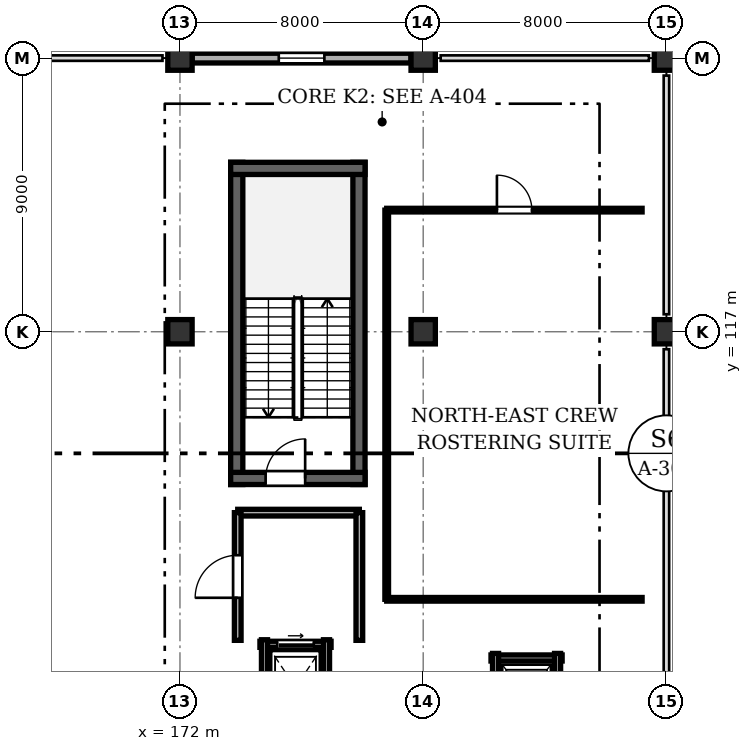
"""IFC4 building model, lengths in metres.
Left out: names, types, materials, properties, quantities, classifications, styles, units other than length and angle.
Written with IfcOpenShell. Run it as: python <this file> out.ifc"""

import sys

from ifc_helpers import new_model, si_unit, direction, frame, frame_2d, origin, origin_2d, place, context, subcontext, project, spatial, rectangle, extrude, element, fill, save


model = new_model("IFC4")
c1 = context("Model", 3, precision=1e-05, world=origin(), true_north=direction((0.0, 1.0)))
c2 = subcontext(c1, "Body", "Model", "MODEL_VIEW")
j1 = project(units=[si_unit("LENGTHUNIT", "METRE"), si_unit("PLANEANGLEUNIT", "RADIAN")], contexts=[c1])
p1 = place(None, origin())
s1 = spatial("IfcSite", under=j1, at=p1, CompositionType="ELEMENT")
p2 = place(p1, origin())
s2 = spatial("IfcBuilding", under=s1, at=p2, CompositionType="ELEMENT")
p3 = place(p2, frame((0.0, 0.0, 6.6)))
s3 = spatial("IfcBuildingStorey", under=s2, at=p3, CompositionType="ELEMENT", Elevation=6.6)
for number, where, z_axis, x_axis in (
    (1, (172.0, 117.0, 0.0), (0.0, 0.0, 1.0), (1.0, 0.0, 0.0)),
    (2, (172.0, 126.0, 0.0), (0.0, 0.0, 1.0), (1.0, 0.0, 0.0)),
    (3, (180.0, 117.0, 0.0), (0.0, 0.0, 1.0), (1.0, 0.0, 0.0)),
    (4, (180.0, 126.0, 0.0), (0.0, 0.0, 1.0), (1.0, 0.0, 0.0)),
    (5, (188.0, 117.0, 0.0), (0.0, 0.0, 1.0), (1.0, 0.0, 0.0)),
    (6, (188.0, 126.0, 0.0), (0.0, 0.0, 1.0), (1.0, 0.0, 0.0)),
):
    element("IfcColumn", number, at=place(p3, frame(where, z_axis=z_axis, x_axis=x_axis)), inside=s3, PredefinedType="COLUMN", context=c2, shape_type="SweptSolid", body=[
        extrude(rectangle(XDim=0.8, YDim=0.8, at=origin_2d()), origin(), (0.0, 0.0, 1.0), 4.2),
    ])
p4 = place(p3, frame((172.4, 126.0, 0.0), z_axis=(0.0, 0.0, 1.0), x_axis=(1.0, 0.0, 0.0)))
e7 = element("IfcWall", 7, at=p4, inside=s3, PredefinedType="SOLIDWALL", context=c2, shape_type="SweptSolid", body=[
    extrude(rectangle(XDim=7.2, YDim=0.32, at=frame_2d((3.6, 0.0))), origin(), (0.0, 0.0, 1.0), 3.495),
])
p5 = place(p4, frame((2.85, 0.0, 0.9)))
e8 = element("IfcOpeningElement", 8, at=p5, cuts=e7, PredefinedType="OPENING", context=c2, shape_type="SweptSolid", body=[
    extrude(rectangle(XDim=1.5, YDim=1.8, at=frame_2d((0.75, 0.9))), frame((0.0, 0.17, 0.0), z_axis=(0.0, -1.0, 0.0), x_axis=(1.0, 0.0, 0.0)), (0.0, 0.0, 1.0), 0.34),
])
for number, where, z_axis, x_axis in (
    (9, (177.887, 111.975, 0.0), (0.0, 0.0, 1.0), (0.0, 1.0, 0.0)),
    (10, (173.867, 122.573, 0.0), (0.0, 0.0, 1.0), (0.0, -1.0, 0.0)),
):
    element("IfcWall", number, at=place(p3, frame(where, z_axis=z_axis, x_axis=x_axis)), inside=s3, PredefinedType="SHEAR", context=c2, shape_type="SweptSolid", body=[
        extrude(rectangle(XDim=10.597, YDim=0.4, at=frame_2d((5.299, 0.0))), origin(), (0.0, 0.0, 1.0), 3.98),
    ])
p6 = place(p3, frame((178.087, 122.373, 0.0), z_axis=(0.0, 0.0, 1.0), x_axis=(-1.0, 0.0, 0.0)))
e11 = element("IfcWall", 11, at=p6, inside=s3, PredefinedType="SHEAR", context=c2, shape_type="SweptSolid", body=[
    extrude(rectangle(XDim=4.42, YDim=0.4, at=frame_2d((2.21, 0.0))), origin(), (0.0, 0.0, 1.0), 3.98),
])
p7 = place(p3, frame((173.667, 112.175, 0.0), z_axis=(0.0, 0.0, 1.0), x_axis=(1.0, 0.0, 0.0)))
e12 = element("IfcWall", 12, at=p7, inside=s3, PredefinedType="SHEAR", context=c2, shape_type="SweptSolid", body=[
    extrude(rectangle(XDim=4.42, YDim=0.4, at=frame_2d((2.21, 0.0))), origin(), (0.0, 0.0, 1.0), 3.98),
])
p8 = place(p7, frame((1.15, 0.0, 0.0)))
e13 = element("IfcOpeningElement", 13, at=p8, cuts=e12, PredefinedType="OPENING", context=c2, shape_type="SweptSolid", body=[
    extrude(rectangle(XDim=1.3, YDim=2.1, at=frame_2d((0.65, 1.05))), frame((0.0, 0.21, 0.0), z_axis=(0.0, -1.0, 0.0), x_axis=(1.0, 0.0, 0.0)), (0.0, 0.0, 1.0), 0.42),
])
p9 = place(p3, frame((176.97, 106.72, 0.0), z_axis=(0.0, 0.0, 1.0), x_axis=(-1.0, 0.0, 0.0)))
e14 = element("IfcWall", 14, at=p9, inside=s3, PredefinedType="SOLIDWALL", context=c2, shape_type="SweptSolid", body=[
    extrude(rectangle(XDim=2.34, YDim=0.2, at=frame_2d((1.17, 0.0))), origin(), (0.0, 0.0, 1.0), 3.955),
])
p10 = place(p9, frame((0.57, 0.0, 0.0)))
e15 = element("IfcOpeningElement", 15, at=p10, cuts=e14, PredefinedType="OPENING", context=c2, shape_type="SweptSolid", body=[
    extrude(rectangle(XDim=1.2, YDim=2.15, at=frame_2d((0.6, 1.075))), frame((0.0, 0.11, 0.0), z_axis=(0.0, -1.0, 0.0), x_axis=(1.0, 0.0, 0.0)), (0.0, 0.0, 1.0), 0.22),
])
for number, where, z_axis, x_axis in (
    (16, (174.78, 106.87, 0.0), (0.0, 0.0, 1.0), (0.0, -1.0, 0.0)),
    (17, (176.82, 103.73, 0.0), (0.0, 0.0, 1.0), (0.0, 1.0, 0.0)),
):
    element("IfcWall", number, at=place(p3, frame(where, z_axis=z_axis, x_axis=x_axis)), inside=s3, PredefinedType="SOLIDWALL", context=c2, shape_type="SweptSolid", body=[
        extrude(rectangle(XDim=3.14, YDim=0.2, at=frame_2d((1.57, 0.0))), origin(), (0.0, 0.0, 1.0), 3.515),
    ])
p11 = place(p3, frame((184.57, 106.27, 0.0), z_axis=(0.0, 0.0, 1.0), x_axis=(-1.0, 0.0, 0.0)))
e18 = element("IfcWall", 18, at=p11, inside=s3, PredefinedType="SOLIDWALL", context=c2, shape_type="SweptSolid", body=[
    extrude(rectangle(XDim=2.34, YDim=0.2, at=frame_2d((1.17, 0.0))), origin(), (0.0, 0.0, 1.0), 3.955),
])
for number, where, z_axis, x_axis in (
    (19, (182.38, 106.42, 0.0), (0.0, 0.0, 1.0), (0.0, -1.0, 0.0)),
    (20, (184.42, 103.58, 0.0), (0.0, 0.0, 1.0), (0.0, 1.0, 0.0)),
):
    element("IfcWall", number, at=place(p3, frame(where, z_axis=z_axis, x_axis=x_axis)), inside=s3, PredefinedType="SOLIDWALL", context=c2, shape_type="SweptSolid", body=[
        extrude(rectangle(XDim=2.84, YDim=0.2, at=frame_2d((1.42, 0.0))), origin(), (0.0, 0.0, 1.0), 3.515),
    ])
p12 = place(p3, frame((187.2, 108.2, 0.0), z_axis=(0.0, 0.0, 1.0), x_axis=(-1.0, 0.0, 0.0)))
e21 = element("IfcWall", 21, at=p12, inside=s3, PredefinedType="PARTITIONING", context=c2, shape_type="SweptSolid", body=[
    extrude(rectangle(XDim=8.4, YDim=0.12, at=frame_2d((4.2, 0.0))), origin(), (0.0, 0.0, 1.0), 3.355),
])
p13 = place(p3, frame((178.8, 121.0, 0.0), z_axis=(0.0, 0.0, 1.0), x_axis=(1.0, 0.0, 0.0)))
e22 = element("IfcWall", 22, at=p13, inside=s3, PredefinedType="PARTITIONING", context=c2, shape_type="SweptSolid", body=[
    extrude(rectangle(XDim=8.4, YDim=0.12, at=frame_2d((4.2, 0.0))), origin(), (0.0, 0.0, 1.0), 3.495),
])
p14 = place(p13, frame((3.625, 0.0, 0.0)))
e23 = element("IfcOpeningElement", 23, at=p14, cuts=e22, PredefinedType="OPENING", context=c2, shape_type="SweptSolid", body=[
    extrude(rectangle(XDim=1.15, YDim=2.1, at=frame_2d((0.575, 1.05))), frame((0.0, 0.07, 0.0), z_axis=(0.0, -1.0, 0.0), x_axis=(1.0, 0.0, 0.0)), (0.0, 0.0, 1.0), 0.14),
])
p15 = place(p3, frame((178.8, 108.2, 0.0), z_axis=(0.0, 0.0, 1.0), x_axis=(0.0, 1.0, 0.0)))
e24 = element("IfcWall", 24, at=p15, inside=s3, PredefinedType="PARTITIONING", context=c2, shape_type="SweptSolid", body=[
    extrude(rectangle(XDim=12.8, YDim=0.12, at=frame_2d((6.4, 0.0))), origin(), (0.0, 0.0, 1.0), 3.955),
])
p16 = place(p3, frame((173.9, 111.05, 0.0), z_axis=(0.0, 0.0, 1.0), x_axis=(1.0, 0.0, 0.0)))
e25 = element("IfcWall", 25, at=p16, inside=s3, PredefinedType="SOLIDWALL", context=c2, shape_type="SweptSolid", body=[
    extrude(rectangle(XDim=4.0, YDim=0.22, at=frame_2d((2.0, 0.0))), origin(), (0.0, 0.0, 1.0), 3.955),
])
p17 = place(p3, frame((173.9, 106.85, 0.0), z_axis=(0.0, 0.0, 1.0), x_axis=(0.0, 1.0, 0.0)))
e26 = element("IfcWall", 26, at=p17, inside=s3, PredefinedType="SOLIDWALL", context=c2, shape_type="SweptSolid", body=[
    extrude(rectangle(XDim=4.2, YDim=0.22, at=frame_2d((2.1, 0.0))), origin(), (0.0, 0.0, 1.0), 3.955),
])
p18 = place(p17, frame((1.4, 0.0, 0.0)))
e27 = element("IfcOpeningElement", 27, at=p18, cuts=e26, PredefinedType="OPENING", context=c2, shape_type="SweptSolid", body=[
    extrude(rectangle(XDim=1.4, YDim=2.1, at=frame_2d((0.7, 1.05))), frame((0.0, 0.12, 0.0), z_axis=(0.0, -1.0, 0.0), x_axis=(1.0, 0.0, 0.0)), (0.0, 0.0, 1.0), 0.24),
])
p19 = place(p3, frame((177.9, 111.05, 0.0), z_axis=(0.0, 0.0, 1.0), x_axis=(0.0, -1.0, 0.0)))
e28 = element("IfcWall", 28, at=p19, inside=s3, PredefinedType="SOLIDWALL", context=c2, shape_type="SweptSolid", body=[
    extrude(rectangle(XDim=4.2, YDim=0.22, at=frame_2d((2.1, 0.0))), origin(), (0.0, 0.0, 1.0), 3.955),
])
p20 = place(p5, origin())
e29 = element("IfcWindow", 29, at=p20, inside=s3, PartitioningType="SINGLE_PANEL", PredefinedType="WINDOW", context=c2, shape_type="SweptSolid", body=[
    extrude(rectangle(XDim=1.5, YDim=1.8, at=frame_2d((0.75, 0.9))), frame((0.0, 0.03, 0.0), z_axis=(0.0, -1.0, 0.0), x_axis=(1.0, 0.0, 0.0)), (0.0, 0.0, 1.0), 0.06),
])
fill(e8, e29)
p21 = place(p8, origin())
e30 = element("IfcDoor", 30, at=p21, inside=s3, OperationType="SINGLE_SWING_RIGHT", PredefinedType="DOOR", context=c2, shape_type="SweptSolid", body=[
    extrude(rectangle(XDim=1.3, YDim=2.1, at=frame_2d((0.65, 1.05))), frame((0.0, 0.025, 0.0), z_axis=(0.0, -1.0, 0.0), x_axis=(1.0, 0.0, 0.0)), (0.0, 0.0, 1.0), 0.05),
])
fill(e13, e30)
p22 = place(p10, origin())
e31 = element("IfcDoor", 31, at=p22, inside=s3, OperationType="SLIDING_TO_LEFT", PredefinedType="DOOR", context=c2, shape_type="SweptSolid", body=[
    extrude(rectangle(XDim=1.2, YDim=2.15, at=frame_2d((0.6, 1.075))), frame((0.0, 0.025, 0.0), z_axis=(0.0, -1.0, 0.0), x_axis=(1.0, 0.0, 0.0)), (0.0, 0.0, 1.0), 0.05),
])
fill(e15, e31)
p23 = place(p14, origin())
e32 = element("IfcDoor", 32, at=p23, inside=s3, OperationType="SINGLE_SWING_LEFT", PredefinedType="DOOR", context=c2, shape_type="SweptSolid", body=[
    extrude(rectangle(XDim=1.15, YDim=2.1, at=frame_2d((0.575, 1.05))), frame((0.0, 0.025, 0.0), z_axis=(0.0, -1.0, 0.0), x_axis=(1.0, 0.0, 0.0)), (0.0, 0.0, 1.0), 0.05),
])
fill(e23, e32)
p24 = place(p18, origin())
e33 = element("IfcDoor", 33, at=p24, inside=s3, OperationType="SINGLE_SWING_LEFT", PredefinedType="DOOR", context=c2, shape_type="SweptSolid", body=[
    extrude(rectangle(XDim=1.4, YDim=2.1, at=frame_2d((0.7, 1.05))), frame((0.0, 0.025, 0.0), z_axis=(0.0, -1.0, 0.0), x_axis=(1.0, 0.0, 0.0)), (0.0, 0.0, 1.0), 0.05),
])
fill(e27, e33)
save(model, sys.argv[1])
